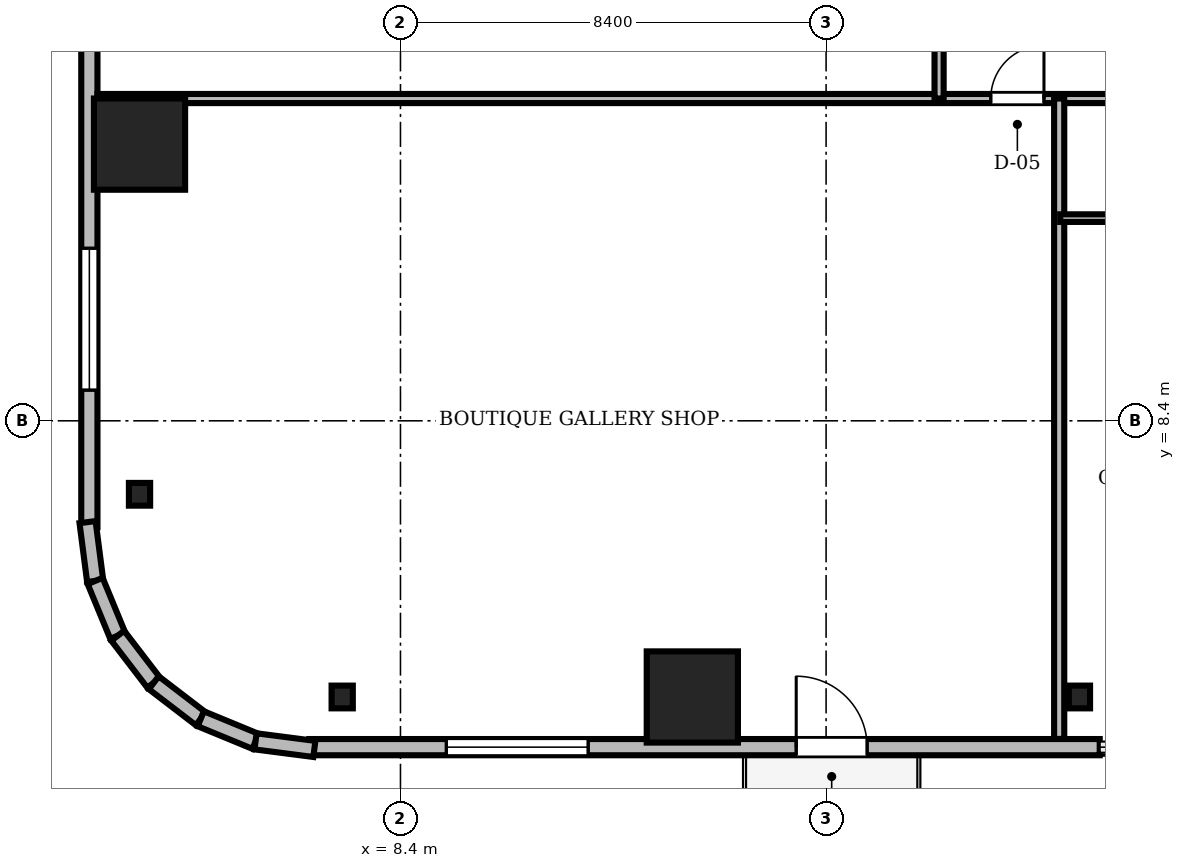
"""IFC4 building model, lengths in metres.
Left out: names, types, materials, properties, quantities, classifications, styles, units other than length and angle.
Written with IfcOpenShell. Run it as: python <this file> out.ifc"""

import sys

from ifc_helpers import new_model, si_unit, direction, frame, frame_2d, origin, origin_2d, place, context, subcontext, project, spatial, rectangle, i_section, extrude, source, transform, mapped, element, fill, save


model = new_model("IFC4")
c1 = context("Model", 3, precision=1e-05, world=origin(), true_north=direction((0.0, 1.0)))
c2 = subcontext(c1, "Body", "Model", "MODEL_VIEW")
j1 = project(units=[si_unit("LENGTHUNIT", "METRE"), si_unit("PLANEANGLEUNIT", "RADIAN")], contexts=[c1])
p1 = place(None, origin())
s1 = spatial("IfcSite", under=j1, at=p1, CompositionType="ELEMENT")
p2 = place(p1, origin())
s2 = spatial("IfcBuilding", under=s1, at=p2, CompositionType="ELEMENT")
p3 = place(p2, frame((0.0, 0.0, 49.5)))
s3 = spatial("IfcBuildingStorey", under=s2, at=p3, CompositionType="ELEMENT", Elevation=49.5)
m1 = source(origin(), c2, "Body", "SweptSolid", [
    extrude(rectangle(XDim=1.8, YDim=1.8, at=origin_2d()), origin(), (0.0, 0.0, 1.0), 3.41),
])
for number, where, z_axis, x_axis in (
    (1, (14.16, 2.95, 0.0), (0.0, 0.0, 1.0), (1.0, 0.0, 0.0)),
    (2, (3.25, 13.86, 0.0), (0.0, 0.0, 1.0), (1.0, 0.0, 0.0)),
):
    element("IfcColumn", number, at=place(p3, frame(where, z_axis=z_axis, x_axis=x_axis)), inside=s3, PredefinedType="COLUMN", context=c2, shape_type="MappedRepresentation", body=[
        mapped(m1, transform((0.0, 0.0, 0.0), scale=1.0)),
    ])
m2 = source(origin(), c2, "Body", "SweptSolid", [
    extrude(i_section(OverallWidth=0.419, OverallDepth=0.449, WebThickness=0.031, FlangeThickness=0.048, FilletRadius=0.015, at=origin_2d()), origin(), (0.0, 0.0, 1.0), 3.41),
])
for number, where, z_axis, x_axis in (
    (3, (7.25, 2.95, 0.0), (0.0, 0.0, 1.0), (1.0, 0.0, 0.0)),
    (4, (21.8, 2.95, 0.0), (0.0, 0.0, 1.0), (1.0, 0.0, 0.0)),
    (5, (3.25, 6.95, 0.0), (0.0, 0.0, 1.0), (1.0, 0.0, 0.0)),
):
    element("IfcColumn", number, at=place(p3, frame(where, z_axis=z_axis, x_axis=x_axis)), inside=s3, PredefinedType="COLUMN", context=c2, shape_type="MappedRepresentation", body=[
        mapped(m2, transform((0.0, 0.0, 0.0), scale=1.0)),
    ])
m3 = source(origin(), c2, "Body", "SweptSolid", [
    extrude(rectangle(XDim=15.6, YDim=0.32, at=frame_2d((7.8, 0.0))), origin(), (0.0, 0.0, 1.0), 3.41),
])
p4 = place(p3, frame((6.6, 1.96, 0.0), z_axis=(0.0, 0.0, 1.0), x_axis=(1.0, 0.0, 0.0)))
e6 = element("IfcWall", 6, at=p4, inside=s3, PredefinedType="SOLIDWALL", context=c2, shape_type="MappedRepresentation", body=[
    mapped(m3, transform((0.0, 0.0, 0.0), scale=1.0)),
])
m4 = source(origin(), c2, "Body", "SweptSolid", [
    extrude(rectangle(XDim=1.4, YDim=2.3, at=frame_2d((0.7, 1.15))), frame((0.0, 0.17, 0.0), z_axis=(0.0, -1.0, 0.0), x_axis=(1.0, 0.0, 0.0)), (0.0, 0.0, 1.0), 0.34),
])
p5 = place(p4, frame((9.61, 0.0, 0.0)))
e7 = element("IfcOpeningElement", 7, at=p5, cuts=e6, PredefinedType="OPENING", context=c2, shape_type="MappedRepresentation", body=[
    mapped(m4, transform((0.0, 0.0, 0.0), scale=1.0)),
])
m5 = source(origin(), c2, "Body", "SweptSolid", [
    extrude(rectangle(XDim=2.8, YDim=2.4, at=frame_2d((1.4, 1.2))), frame((0.0, 0.17, 0.0), z_axis=(0.0, -1.0, 0.0), x_axis=(1.0, 0.0, 0.0)), (0.0, 0.0, 1.0), 0.34),
])
p6 = place(p4, frame((2.705, 0.0, 0.72)))
e8 = element("IfcOpeningElement", 8, at=p6, cuts=e6, PredefinedType="OPENING", context=c2, shape_type="MappedRepresentation", body=[
    mapped(m5, transform((0.0, 0.0, 0.0), scale=1.0)),
])
p7 = place(p3, frame((2.26, 21.9, 0.0), z_axis=(0.0, 0.0, 1.0), x_axis=(0.0, -1.0, 0.0)))
e9 = element("IfcWall", 9, at=p7, inside=s3, PredefinedType="SOLIDWALL", context=c2, shape_type="MappedRepresentation", body=[
    mapped(m3, transform((0.0, 0.0, 0.0), scale=1.0)),
])
p8 = place(p7, frame((10.095, 0.0, 0.72)))
e10 = element("IfcOpeningElement", 10, at=p8, cuts=e9, PredefinedType="OPENING", context=c2, shape_type="MappedRepresentation", body=[
    mapped(m5, transform((0.0, 0.0, 0.0), scale=1.0)),
])
m6 = source(origin(), c2, "Body", "SweptSolid", [
    extrude(rectangle(XDim=1.171, YDim=0.32, at=frame_2d((0.585, 0.0))), origin(), (0.0, 0.0, 1.0), 3.41),
])
p9 = place(p3, frame((2.224, 6.401, 0.0), z_axis=(0.0, 0.0, 1.0), x_axis=(0.128269133229, -0.991739395941, 0.0)))
e11 = element("IfcWall", 11, at=p9, inside=s3, PredefinedType="SOLIDWALL", context=c2, shape_type="MappedRepresentation", body=[
    mapped(m6, transform((0.0, 0.0, 0.0), scale=1.0)),
])
m7 = source(origin(), c2, "Body", "SweptSolid", [
    extrude(rectangle(XDim=1.169, YDim=0.32, at=frame_2d((0.584, 0.0))), origin(), (0.0, 0.0, 1.0), 3.41),
])
for number, where, z_axis, x_axis in (
    (12, (2.375, 5.24, 0.0), (0.0, 0.0, 1.0), (0.381, -0.925, 0.0)),
    (13, (2.82, 4.159, 0.0), (0.0, 0.0, 1.0), (0.608, -0.794, 0.0)),
):
    element("IfcWall", number, at=place(p3, frame(where, z_axis=z_axis, x_axis=x_axis)), inside=s3, PredefinedType="SOLIDWALL", context=c2, shape_type="MappedRepresentation", body=[
        mapped(m7, transform((0.0, 0.0, 0.0), scale=1.0)),
    ])
m8 = source(origin(), c2, "Body", "SweptSolid", [
    extrude(rectangle(XDim=1.169, YDim=0.32, at=frame_2d((0.584, 0.0))), origin(), (0.0, 0.0, 1.0), 3.41),
])
p10 = place(p3, frame((3.531, 3.231, 0.0), z_axis=(0.0, 0.0, 1.0), x_axis=(0.793663520347, -0.608356981114, 0.0)))
e14 = element("IfcWall", 14, at=p10, inside=s3, PredefinedType="SOLIDWALL", context=c2, shape_type="MappedRepresentation", body=[
    mapped(m8, transform((0.0, 0.0, 0.0), scale=1.0)),
])
m9 = source(origin(), c2, "Body", "SweptSolid", [
    extrude(rectangle(XDim=1.169, YDim=0.32, at=frame_2d((0.585, 0.0))), origin(), (0.0, 0.0, 1.0), 3.41),
])
p11 = place(p3, frame((4.459, 2.52, 0.0), z_axis=(0.0, 0.0, 1.0), x_axis=(0.924479075121, -0.381232789334, 0.0)))
e15 = element("IfcWall", 15, at=p11, inside=s3, PredefinedType="SOLIDWALL", context=c2, shape_type="MappedRepresentation", body=[
    mapped(m9, transform((0.0, 0.0, 0.0), scale=1.0)),
])
m10 = source(origin(), c2, "Body", "SweptSolid", [
    extrude(rectangle(XDim=1.17, YDim=0.32, at=frame_2d((0.585, 0.0))), origin(), (0.0, 0.0, 1.0), 3.41),
])
p12 = place(p3, frame((5.54, 2.074, 0.0), z_axis=(0.0, 0.0, 1.0), x_axis=(0.991762485493, -0.128090485085, 0.0)))
e16 = element("IfcWall", 16, at=p12, inside=s3, PredefinedType="SOLIDWALL", context=c2, shape_type="MappedRepresentation", body=[
    mapped(m10, transform((0.0, 0.0, 0.0), scale=1.0)),
])
m11 = source(origin(), c2, "Body", "SweptSolid", [
    extrude(rectangle(XDim=46.156, YDim=0.18, at=frame_2d((23.078, 0.0))), origin(), (0.0, 0.0, 1.0), 2.652),
])
p13 = place(p3, frame((2.422, 14.76, 0.0), z_axis=(0.0, 0.0, 1.0), x_axis=(1.0, 0.0, 0.0)))
e17 = element("IfcWall", 17, at=p13, inside=s3, PredefinedType="PARTITIONING", context=c2, shape_type="MappedRepresentation", body=[
    mapped(m11, transform((0.0, 0.0, 0.0), scale=1.0)),
])
m12 = source(origin(), c2, "Body", "SweptSolid", [
    extrude(rectangle(XDim=1.05, YDim=2.2, at=frame_2d((0.525, 1.1))), frame((0.0, 0.1, 0.0), z_axis=(0.0, -1.0, 0.0), x_axis=(1.0, 0.0, 0.0)), (0.0, 0.0, 1.0), 0.2),
])
p14 = place(p13, frame((17.628, 0.0, 0.0)))
e18 = element("IfcOpeningElement", 18, at=p14, cuts=e17, PredefinedType="OPENING", context=c2, shape_type="MappedRepresentation", body=[
    mapped(m12, transform((0.0, 0.0, 0.0), scale=1.0)),
])
m13 = source(origin(), c2, "Body", "SweptSolid", [
    extrude(rectangle(XDim=0.95, YDim=2.15, at=frame_2d((0.475, 1.075))), frame((0.0, 0.1, 0.0), z_axis=(0.0, -1.0, 0.0), x_axis=(1.0, 0.0, 0.0)), (0.0, 0.0, 1.0), 0.2),
])
p15 = place(p13, frame((22.116, 0.0, 0.0)))
e19 = element("IfcOpeningElement", 19, at=p15, cuts=e17, PredefinedType="OPENING", context=c2, shape_type="MappedRepresentation", body=[
    mapped(m13, transform((0.0, 0.0, 0.0), scale=1.0)),
])
p16 = place(p13, frame((25.758, 0.0, 0.0)))
e20 = element("IfcOpeningElement", 20, at=p16, cuts=e17, PredefinedType="OPENING", context=c2, shape_type="MappedRepresentation", body=[
    mapped(m12, transform((0.0, 0.0, 0.0), scale=1.0)),
])
p17 = place(p13, frame((30.625, 0.0, 0.0)))
e21 = element("IfcOpeningElement", 21, at=p17, cuts=e17, PredefinedType="OPENING", context=c2, shape_type="MappedRepresentation", body=[
    mapped(m12, transform((0.0, 0.0, 0.0), scale=1.0)),
])
p18 = place(p13, frame((36.716, 0.0, 0.0)))
e22 = element("IfcOpeningElement", 22, at=p18, cuts=e17, PredefinedType="OPENING", context=c2, shape_type="MappedRepresentation", body=[
    mapped(m13, transform((0.0, 0.0, 0.0), scale=1.0)),
])
p19 = place(p13, frame((41.766, 0.0, 0.0)))
e23 = element("IfcOpeningElement", 23, at=p19, cuts=e17, PredefinedType="OPENING", context=c2, shape_type="MappedRepresentation", body=[
    mapped(m12, transform((0.0, 0.0, 0.0), scale=1.0)),
])
m14 = source(origin(), c2, "Body", "SweptSolid", [
    extrude(rectangle(XDim=13.79, YDim=0.18, at=frame_2d((6.895, 0.0))), origin(), (0.0, 0.0, 1.0), 2.802),
])
p20 = place(p3, frame((19.03, 14.76, 0.0), z_axis=(0.0, 0.0, 1.0), x_axis=(0.0, 1.0, 0.0)))
e24 = element("IfcWall", 24, at=p20, inside=s3, PredefinedType="PARTITIONING", context=c2, shape_type="MappedRepresentation", body=[
    mapped(m14, transform((0.0, 0.0, 0.0), scale=1.0)),
])
m15 = source(origin(), c2, "Body", "SweptSolid", [
    extrude(rectangle(XDim=12.638, YDim=0.2, at=frame_2d((6.319, 0.0))), origin(), (0.0, 0.0, 1.0), 2.652),
])
p21 = place(p3, frame((21.4, 2.122, 0.0), z_axis=(0.0, 0.0, 1.0), x_axis=(0.0, 1.0, 0.0)))
e25 = element("IfcWall", 25, at=p21, inside=s3, PredefinedType="PARTITIONING", context=c2, shape_type="MappedRepresentation", body=[
    mapped(m15, transform((0.0, 0.0, 0.0), scale=1.0)),
])
m16 = source(origin(), c2, "Body", "SweptSolid", [
    extrude(rectangle(XDim=2.29, YDim=0.15, at=frame_2d((1.145, 0.0))), origin(), (0.0, 0.0, 1.0), 3.41),
])
p22 = place(p3, frame((21.42, 12.4, 0.0), z_axis=(0.0, 0.0, 1.0), x_axis=(1.0, 0.0, 0.0)))
e26 = element("IfcWall", 26, at=p22, inside=s3, PredefinedType="PARTITIONING", context=c2, shape_type="MappedRepresentation", body=[
    mapped(m16, transform((0.0, 0.0, 0.0), scale=1.0)),
])
m17 = source(origin(), c2, "Body", "SweptSolid", [
    extrude(rectangle(XDim=1.4, YDim=2.3, at=frame_2d((0.7, 1.15))), frame((0.0, 0.025, 0.0), z_axis=(0.0, -1.0, 0.0), x_axis=(1.0, 0.0, 0.0)), (0.0, 0.0, 1.0), 0.05),
])
p23 = place(p5, frame((1.4, 0.0, 0.0), z_axis=(0.0, 0.0, 1.0), x_axis=(-1.0, 0.0, 0.0)))
e27 = element("IfcDoor", 27, at=p23, inside=s3, OperationType="DOUBLE_DOOR_SLIDING", PredefinedType="DOOR", context=c2, shape_type="MappedRepresentation", body=[
    mapped(m17, transform((0.0, 0.0, 0.0), scale=1.0)),
])
fill(e7, e27)
m18 = source(origin(), c2, "Body", "SweptSolid", [
    extrude(rectangle(XDim=2.8, YDim=2.4, at=frame_2d((1.4, 1.2))), frame((0.0, 0.03, 0.0), z_axis=(0.0, -1.0, 0.0), x_axis=(1.0, 0.0, 0.0)), (0.0, 0.0, 1.0), 0.06),
])
p24 = place(p6, origin())
e28 = element("IfcWindow", 28, at=p24, inside=s3, PartitioningType="SINGLE_PANEL", PredefinedType="WINDOW", context=c2, shape_type="MappedRepresentation", body=[
    mapped(m18, transform((0.0, 0.0, 0.0), scale=1.0)),
])
fill(e8, e28)
p25 = place(p8, origin())
e29 = element("IfcWindow", 29, at=p25, inside=s3, PartitioningType="SINGLE_PANEL", PredefinedType="WINDOW", context=c2, shape_type="MappedRepresentation", body=[
    mapped(m18, transform((0.0, 0.0, 0.0), scale=1.0)),
])
fill(e10, e29)
m19 = source(origin(), c2, "Body", "SweptSolid", [
    extrude(rectangle(XDim=1.05, YDim=2.2, at=frame_2d((0.525, 1.1))), frame((0.0, 0.025, 0.0), z_axis=(0.0, -1.0, 0.0), x_axis=(1.0, 0.0, 0.0)), (0.0, 0.0, 1.0), 0.05),
])
p26 = place(p14, origin())
e30 = element("IfcDoor", 30, at=p26, inside=s3, OperationType="SINGLE_SWING_RIGHT", PredefinedType="DOOR", context=c2, shape_type="MappedRepresentation", body=[
    mapped(m19, transform((0.0, 0.0, 0.0), scale=1.0)),
])
fill(e18, e30)
save(model, sys.argv[1])
